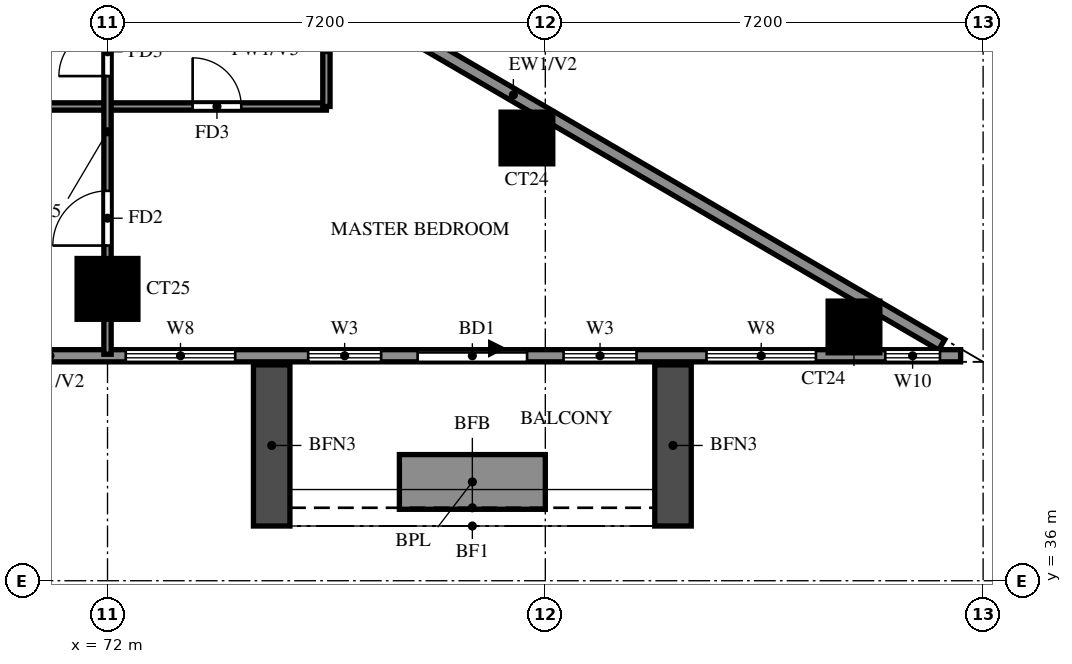
"""IFC4 building model, lengths in metres.
Left out: names, types, materials, properties, quantities, classifications, styles, units other than length and angle.
Written with IfcOpenShell. Run it as: python <this file> out.ifc"""

import sys

from ifc_helpers import new_model, si_unit, direction, frame, frame_2d, origin, origin_2d, place, context, subcontext, project, spatial, rectangle, extrude, source, transform, mapped, element, fill, save


model = new_model("IFC4")
c1 = context("Model", 3, precision=1e-05, world=origin(), true_north=direction((0.0, 1.0)))
c2 = subcontext(c1, "Body", "Model", "MODEL_VIEW")
j1 = project(units=[si_unit("LENGTHUNIT", "METRE"), si_unit("PLANEANGLEUNIT", "RADIAN")], contexts=[c1])
p1 = place(None, origin())
s1 = spatial("IfcSite", under=j1, at=p1, CompositionType="ELEMENT")
p2 = place(p1, origin())
s2 = spatial("IfcBuilding", under=s1, at=p2, CompositionType="ELEMENT")
p3 = place(p2, frame((0.0, 0.0, 153.5)))
s3 = spatial("IfcBuildingStorey", under=s2, at=p3, CompositionType="ELEMENT", Elevation=153.5)
m1 = source(origin(), c2, "Body", "SweptSolid", [
    extrude(rectangle(XDim=0.85, YDim=0.85, at=origin_2d()), origin(), (0.0, 0.0, 1.0), 3.2),
])
p4 = place(p3, frame((84.276, 40.174, 0.0), z_axis=(0.0, 0.0, 1.0), x_axis=(1.0, 0.0, 0.0)))
e1 = element("IfcColumn", 1, at=p4, inside=s3, PredefinedType="COLUMN", context=c2, shape_type="MappedRepresentation", body=[
    mapped(m1, transform((0.0, 0.0, 0.0))),
])
m2 = source(origin(), c2, "Body", "SweptSolid", [
    extrude(rectangle(XDim=1.0, YDim=1.0, at=origin_2d()), origin(), (0.0, 0.0, 1.0), 3.2),
])
p5 = place(p3, frame((72.0, 40.8, 0.0), z_axis=(0.0, 0.0, 1.0), x_axis=(1.0, 0.0, 0.0)))
e2 = element("IfcColumn", 2, at=p5, inside=s3, PredefinedType="COLUMN", context=c2, shape_type="MappedRepresentation", body=[
    mapped(m2, transform((0.0, 0.0, 0.0))),
])
p6 = place(p3, frame((78.898, 43.282, 0.0), z_axis=(0.0, 0.0, 1.0), x_axis=(1.0, 0.0, 0.0)))
e3 = element("IfcColumn", 3, at=p6, inside=s3, PredefinedType="COLUMN", context=c2, shape_type="MappedRepresentation", body=[
    mapped(m1, transform((0.0, 0.0, 0.0))),
])
p7 = place(p3, frame((85.719, 39.881, 0.0), z_axis=(0.0, 0.0, 1.0), x_axis=(-0.86377618652, 0.503875678716, 0.0)))
e4 = element("IfcWall", 4, at=p7, inside=s3, PredefinedType="SOLIDWALL", context=c2, shape_type="SweptSolid", body=[
    extrude(rectangle(XDim=16.311, YDim=0.2, at=frame_2d((8.156, 0.0))), origin(), (0.0, 0.0, 1.0), 3.2),
])
p8 = place(p7, frame((13.326, 0.0, 1.5)))
e5 = element("IfcOpeningElement", 5, at=p8, cuts=e4, PredefinedType="OPENING", context=c2, shape_type="SweptSolid", body=[
    extrude(rectangle(XDim=0.9, YDim=0.9, at=frame_2d((0.45, 0.45))), frame((0.0, 0.11, 0.0), z_axis=(0.0, -1.0, 0.0), x_axis=(1.0, 0.0, 0.0)), (0.0, 0.0, 1.0), 0.22),
])
p9 = place(p3, frame((58.8, 39.7, 0.0), z_axis=(0.0, 0.0, 1.0), x_axis=(1.0, 0.0, 0.0)))
e6 = element("IfcWall", 6, at=p9, inside=s3, PredefinedType="SOLIDWALL", context=c2, shape_type="SweptSolid", body=[
    extrude(rectangle(XDim=27.23, YDim=0.2, at=frame_2d((13.615, 0.0))), origin(), (0.0, 0.0, 1.0), 3.2),
])
p10 = place(p9, frame((3.3, 0.0, 0.0)))
e7 = element("IfcOpeningElement", 7, at=p10, cuts=e6, PredefinedType="OPENING", context=c2, shape_type="SweptSolid", body=[
    extrude(rectangle(XDim=1.8, YDim=2.4, at=frame_2d((0.9, 1.2))), frame((0.0, 0.11, 0.0), z_axis=(0.0, -1.0, 0.0), x_axis=(1.0, 0.0, 0.0)), (0.0, 0.0, 1.0), 0.22),
])
p11 = place(p9, frame((18.3, 0.0, 0.0)))
e8 = element("IfcOpeningElement", 8, at=p11, cuts=e6, PredefinedType="OPENING", context=c2, shape_type="SweptSolid", body=[
    extrude(rectangle(XDim=1.8, YDim=2.4, at=frame_2d((0.9, 1.2))), frame((0.0, 0.11, 0.0), z_axis=(0.0, -1.0, 0.0), x_axis=(1.0, 0.0, 0.0)), (0.0, 0.0, 1.0), 0.22),
])
p12 = place(p9, frame((1.95, 0.0, 0.6)))
e9 = element("IfcOpeningElement", 9, at=p12, cuts=e6, PredefinedType="OPENING", context=c2, shape_type="SweptSolid", body=[
    extrude(rectangle(XDim=0.9, YDim=2.4, at=frame_2d((0.45, 1.2))), frame((0.0, 0.11, 0.0), z_axis=(0.0, -1.0, 0.0), x_axis=(1.0, 0.0, 0.0)), (0.0, 0.0, 1.0), 0.22),
])
p13 = place(p9, frame((5.7, 0.0, 0.6)))
e10 = element("IfcOpeningElement", 10, at=p13, cuts=e6, PredefinedType="OPENING", context=c2, shape_type="SweptSolid", body=[
    extrude(rectangle(XDim=1.8, YDim=2.4, at=frame_2d((0.9, 1.2))), frame((0.0, 0.11, 0.0), z_axis=(0.0, -1.0, 0.0), x_axis=(1.0, 0.0, 0.0)), (0.0, 0.0, 1.0), 0.22),
])
p14 = place(p9, frame((8.55, 0.0, 0.6)))
e11 = element("IfcOpeningElement", 11, at=p14, cuts=e6, PredefinedType="OPENING", context=c2, shape_type="SweptSolid", body=[
    extrude(rectangle(XDim=0.9, YDim=2.4, at=frame_2d((0.45, 1.2))), frame((0.0, 0.11, 0.0), z_axis=(0.0, -1.0, 0.0), x_axis=(1.0, 0.0, 0.0)), (0.0, 0.0, 1.0), 0.22),
])
p15 = place(p9, frame((13.5, 0.0, 0.6)))
e12 = element("IfcOpeningElement", 12, at=p15, cuts=e6, PredefinedType="OPENING", context=c2, shape_type="SweptSolid", body=[
    extrude(rectangle(XDim=1.8, YDim=2.4, at=frame_2d((0.9, 1.2))), frame((0.0, 0.11, 0.0), z_axis=(0.0, -1.0, 0.0), x_axis=(1.0, 0.0, 0.0)), (0.0, 0.0, 1.0), 0.22),
])
p16 = place(p9, frame((16.5, 0.0, 0.6)))
e13 = element("IfcOpeningElement", 13, at=p16, cuts=e6, PredefinedType="OPENING", context=c2, shape_type="SweptSolid", body=[
    extrude(rectangle(XDim=1.2, YDim=2.4, at=frame_2d((0.6, 1.2))), frame((0.0, 0.11, 0.0), z_axis=(0.0, -1.0, 0.0), x_axis=(1.0, 0.0, 0.0)), (0.0, 0.0, 1.0), 0.22),
])
p17 = place(p9, frame((20.7, 0.0, 0.6)))
e14 = element("IfcOpeningElement", 14, at=p17, cuts=e6, PredefinedType="OPENING", context=c2, shape_type="SweptSolid", body=[
    extrude(rectangle(XDim=1.2, YDim=2.4, at=frame_2d((0.6, 1.2))), frame((0.0, 0.11, 0.0), z_axis=(0.0, -1.0, 0.0), x_axis=(1.0, 0.0, 0.0)), (0.0, 0.0, 1.0), 0.22),
])
p18 = place(p9, frame((23.051, 0.0, 0.6)))
e15 = element("IfcOpeningElement", 15, at=p18, cuts=e6, PredefinedType="OPENING", context=c2, shape_type="SweptSolid", body=[
    extrude(rectangle(XDim=1.8, YDim=2.4, at=frame_2d((0.9, 1.2))), frame((0.0, 0.11, 0.0), z_axis=(0.0, -1.0, 0.0), x_axis=(1.0, 0.0, 0.0)), (0.0, 0.0, 1.0), 0.22),
])
p19 = place(p9, frame((25.99, 0.0, 0.6)))
e16 = element("IfcOpeningElement", 16, at=p19, cuts=e6, PredefinedType="OPENING", context=c2, shape_type="SweptSolid", body=[
    extrude(rectangle(XDim=0.9, YDim=2.4, at=frame_2d((0.45, 1.2))), frame((0.0, 0.11, 0.0), z_axis=(0.0, -1.0, 0.0), x_axis=(1.0, 0.0, 0.0)), (0.0, 0.0, 1.0), 0.22),
])
for number, where, z_axis, x_axis in (
    (17, (74.7, 39.55, 0.0), (0.0, 0.0, 1.0), (0.0, -1.0, 0.0)),
    (18, (81.3, 39.55, 0.0), (0.0, 0.0, 1.0), (0.0, -1.0, 0.0)),
):
    element("IfcWall", number, at=place(p3, frame(where, z_axis=z_axis, x_axis=x_axis)), inside=s3, PredefinedType="SOLIDWALL", context=c2, shape_type="SweptSolid", body=[
        extrude(rectangle(XDim=2.65, YDim=0.6, at=frame_2d((1.325, 0.0))), origin(), (0.0, 0.0, 1.0), 2.85),
    ])
p20 = place(p3, frame((76.8, 37.625, 0.0), z_axis=(0.0, 0.0, 1.0), x_axis=(1.0, 0.0, 0.0)))
e19 = element("IfcWall", 19, at=p20, inside=s3, PredefinedType="SOLIDWALL", context=c2, shape_type="SweptSolid", body=[
    extrude(rectangle(XDim=2.4, YDim=0.9, at=frame_2d((1.2, 0.0))), origin(), (0.0, 0.0, 1.0), 0.9),
])
p21 = place(p3, frame((60.0, 43.8, 0.0), z_axis=(0.0, 0.0, 1.0), x_axis=(1.0, 0.0, 0.0)))
e20 = element("IfcWall", 20, at=p21, inside=s3, PredefinedType="PARTITIONING", context=c2, shape_type="SweptSolid", body=[
    extrude(rectangle(XDim=15.6, YDim=0.12, at=frame_2d((7.8, 0.0))), origin(), (0.0, 0.0, 1.0), 3.2),
])
p22 = place(p21, frame((9.75, 0.0, 0.0)))
e21 = element("IfcOpeningElement", 21, at=p22, cuts=e20, PredefinedType="OPENING", context=c2, shape_type="SweptSolid", body=[
    extrude(rectangle(XDim=0.9, YDim=2.1, at=frame_2d((0.45, 1.05))), frame((0.0, 0.07, 0.0), z_axis=(0.0, -1.0, 0.0), x_axis=(1.0, 0.0, 0.0)), (0.0, 0.0, 1.0), 0.14),
])
p23 = place(p21, frame((3.45, 0.0, 0.0)))
e22 = element("IfcOpeningElement", 22, at=p23, cuts=e20, PredefinedType="OPENING", context=c2, shape_type="SweptSolid", body=[
    extrude(rectangle(XDim=1.5, YDim=2.1, at=frame_2d((0.75, 1.05))), frame((0.0, 0.07, 0.0), z_axis=(0.0, -1.0, 0.0), x_axis=(1.0, 0.0, 0.0)), (0.0, 0.0, 1.0), 0.14),
])
p24 = place(p21, frame((13.4, 0.0, 0.0)))
e23 = element("IfcOpeningElement", 23, at=p24, cuts=e20, PredefinedType="OPENING", context=c2, shape_type="SweptSolid", body=[
    extrude(rectangle(XDim=0.8, YDim=2.1, at=frame_2d((0.4, 1.05))), frame((0.0, 0.07, 0.0), z_axis=(0.0, -1.0, 0.0), x_axis=(1.0, 0.0, 0.0)), (0.0, 0.0, 1.0), 0.14),
])
p25 = place(p3, frame((72.0, 39.725, 0.0), z_axis=(0.0, 0.0, 1.0), x_axis=(0.0, 1.0, 0.0)))
e24 = element("IfcWall", 24, at=p25, inside=s3, PredefinedType="PARTITIONING", context=c2, shape_type="SweptSolid", body=[
    extrude(rectangle(XDim=8.13, YDim=0.12, at=frame_2d((4.065, 0.0))), origin(), (0.0, 0.0, 1.0), 2.3),
])
p26 = place(p25, frame((1.788, 0.0, 0.0)))
e25 = element("IfcOpeningElement", 25, at=p26, cuts=e24, PredefinedType="OPENING", context=c2, shape_type="SweptSolid", body=[
    extrude(rectangle(XDim=0.9, YDim=2.1, at=frame_2d((0.45, 1.05))), frame((0.0, 0.07, 0.0), z_axis=(0.0, -1.0, 0.0), x_axis=(1.0, 0.0, 0.0)), (0.0, 0.0, 1.0), 0.14),
])
p27 = place(p25, frame((4.575, 0.0, 0.0)))
e26 = element("IfcOpeningElement", 26, at=p27, cuts=e24, PredefinedType="OPENING", context=c2, shape_type="SweptSolid", body=[
    extrude(rectangle(XDim=0.8, YDim=2.1, at=frame_2d((0.4, 1.05))), frame((0.0, 0.07, 0.0), z_axis=(0.0, -1.0, 0.0), x_axis=(1.0, 0.0, 0.0)), (0.0, 0.0, 1.0), 0.14),
])
p28 = place(p3, frame((75.6, 43.8, 0.0), z_axis=(0.0, 0.0, 1.0), x_axis=(0.0, 1.0, 0.0)))
e27 = element("IfcWall", 27, at=p28, inside=s3, PredefinedType="PARTITIONING", context=c2, shape_type="SweptSolid", body=[
    extrude(rectangle(XDim=1.868, YDim=0.12, at=frame_2d((0.934, 0.0))), origin(), (0.0, 0.0, 1.0), 2.3),
])
p29 = place(p11, origin())
e28 = element("IfcDoor", 28, at=p29, inside=s3, OperationType="DOUBLE_DOOR_SLIDING", PredefinedType="DOOR", context=c2, shape_type="SweptSolid", body=[
    extrude(rectangle(XDim=1.8, YDim=2.4, at=frame_2d((0.9, 1.2))), frame((0.0, 0.025, 0.0), z_axis=(0.0, -1.0, 0.0), x_axis=(1.0, 0.0, 0.0)), (0.0, 0.0, 1.0), 0.05),
])
fill(e8, e28)
p30 = place(p15, origin())
e29 = element("IfcWindow", 29, at=p30, inside=s3, PartitioningType="DOUBLE_PANEL_VERTICAL", PredefinedType="WINDOW", context=c2, shape_type="SweptSolid", body=[
    extrude(rectangle(XDim=1.8, YDim=2.4, at=frame_2d((0.9, 1.2))), frame((0.0, 0.03, 0.0), z_axis=(0.0, -1.0, 0.0), x_axis=(1.0, 0.0, 0.0)), (0.0, 0.0, 1.0), 0.06),
])
fill(e12, e29)
p31 = place(p16, origin())
e30 = element("IfcWindow", 30, at=p31, inside=s3, PartitioningType="SINGLE_PANEL", PredefinedType="WINDOW", context=c2, shape_type="SweptSolid", body=[
    extrude(rectangle(XDim=1.2, YDim=2.4, at=frame_2d((0.6, 1.2))), frame((0.0, 0.03, 0.0), z_axis=(0.0, -1.0, 0.0), x_axis=(1.0, 0.0, 0.0)), (0.0, 0.0, 1.0), 0.06),
])
fill(e13, e30)
p32 = place(p17, origin())
e31 = element("IfcWindow", 31, at=p32, inside=s3, PartitioningType="SINGLE_PANEL", PredefinedType="WINDOW", context=c2, shape_type="SweptSolid", body=[
    extrude(rectangle(XDim=1.2, YDim=2.4, at=frame_2d((0.6, 1.2))), frame((0.0, 0.03, 0.0), z_axis=(0.0, -1.0, 0.0), x_axis=(1.0, 0.0, 0.0)), (0.0, 0.0, 1.0), 0.06),
])
fill(e14, e31)
p33 = place(p18, origin())
e32 = element("IfcWindow", 32, at=p33, inside=s3, PartitioningType="DOUBLE_PANEL_VERTICAL", PredefinedType="WINDOW", context=c2, shape_type="SweptSolid", body=[
    extrude(rectangle(XDim=1.8, YDim=2.4, at=frame_2d((0.9, 1.2))), frame((0.0, 0.03, 0.0), z_axis=(0.0, -1.0, 0.0), x_axis=(1.0, 0.0, 0.0)), (0.0, 0.0, 1.0), 0.06),
])
fill(e15, e32)
p34 = place(p19, origin())
e33 = element("IfcWindow", 33, at=p34, inside=s3, PartitioningType="SINGLE_PANEL", PredefinedType="WINDOW", context=c2, shape_type="SweptSolid", body=[
    extrude(rectangle(XDim=0.9, YDim=2.4, at=frame_2d((0.45, 1.2))), frame((0.0, 0.03, 0.0), z_axis=(0.0, -1.0, 0.0), x_axis=(1.0, 0.0, 0.0)), (0.0, 0.0, 1.0), 0.06),
])
fill(e16, e33)
p35 = place(p26, origin())
e34 = element("IfcDoor", 34, at=p35, inside=s3, OperationType="SINGLE_SWING_RIGHT", PredefinedType="DOOR", context=c2, shape_type="SweptSolid", body=[
    extrude(rectangle(XDim=0.9, YDim=2.1, at=frame_2d((0.45, 1.05))), frame((0.0, 0.025, 0.0), z_axis=(0.0, -1.0, 0.0), x_axis=(1.0, 0.0, 0.0)), (0.0, 0.0, 1.0), 0.05),
])
fill(e25, e34)
p36 = place(p27, origin())
e35 = element("IfcDoor", 35, at=p36, inside=s3, OperationType="SINGLE_SWING_RIGHT", PredefinedType="DOOR", context=c2, shape_type="SweptSolid", body=[
    extrude(rectangle(XDim=0.8, YDim=2.1, at=frame_2d((0.4, 1.05))), frame((0.0, 0.025, 0.0), z_axis=(0.0, -1.0, 0.0), x_axis=(1.0, 0.0, 0.0)), (0.0, 0.0, 1.0), 0.05),
])
fill(e26, e35)
p37 = place(p24, origin())
e36 = element("IfcDoor", 36, at=p37, inside=s3, OperationType="SINGLE_SWING_LEFT", PredefinedType="DOOR", context=c2, shape_type="SweptSolid", body=[
    extrude(rectangle(XDim=0.8, YDim=2.1, at=frame_2d((0.4, 1.05))), frame((0.0, 0.025, 0.0), z_axis=(0.0, -1.0, 0.0), x_axis=(1.0, 0.0, 0.0)), (0.0, 0.0, 1.0), 0.05),
])
fill(e23, e36)
save(model, sys.argv[1])
